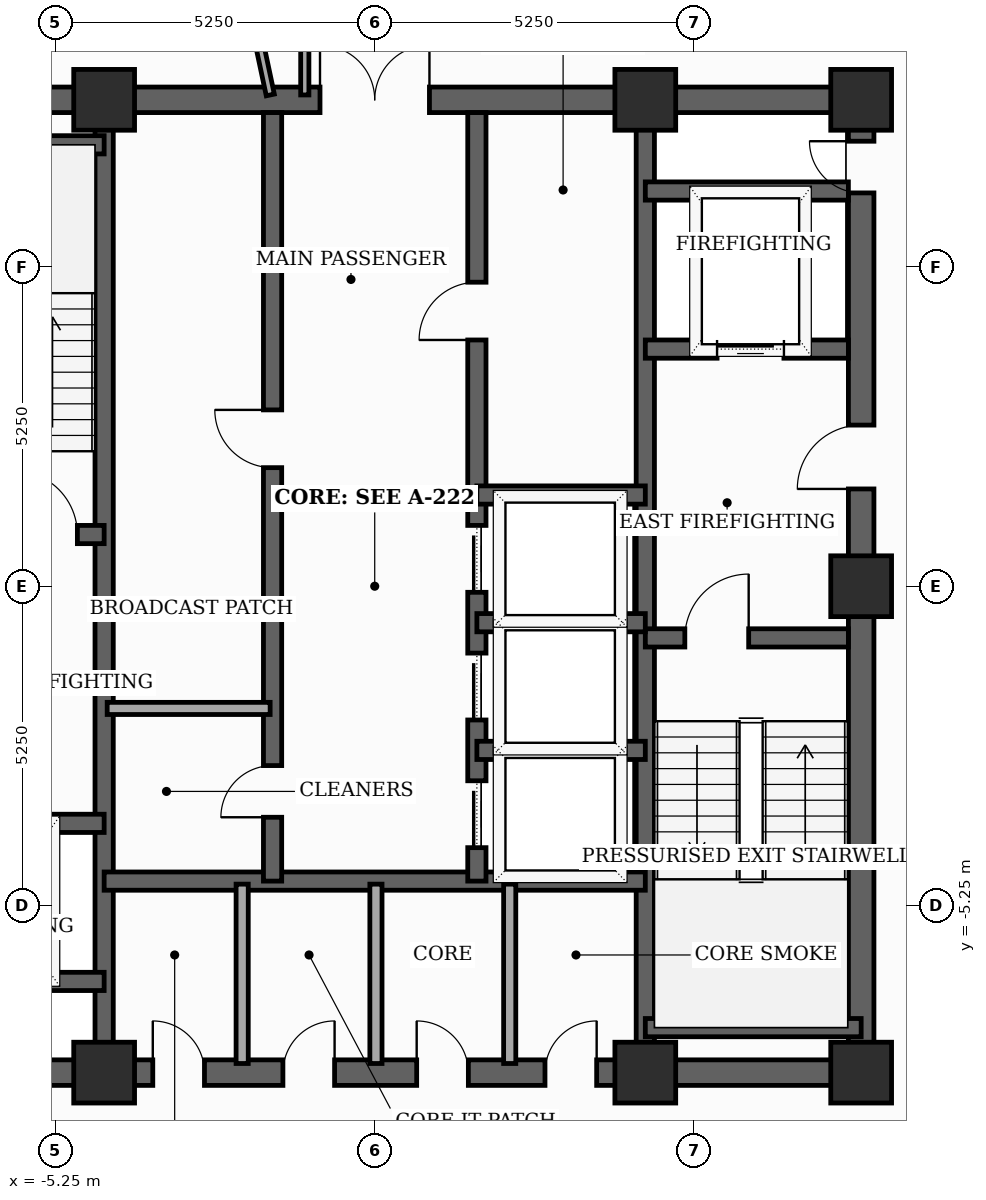
"""IFC4 building model, lengths in metres.
Left out: names, types, materials, properties, quantities, classifications, styles, units other than length and angle.
Written with IfcOpenShell. Run it as: python <this file> out.ifc"""

import sys

from ifc_helpers import new_model, si_unit, direction, frame, frame_2d, origin, origin_2d, place, context, subcontext, project, spatial, rectangle, extrude, element, fill, save


model = new_model("IFC4")
c1 = context("Model", 3, precision=1e-05, world=origin(), true_north=direction((0.0, 1.0)))
c2 = subcontext(c1, "Body", "Model", "MODEL_VIEW")
j1 = project(units=[si_unit("LENGTHUNIT", "METRE"), si_unit("PLANEANGLEUNIT", "RADIAN")], contexts=[c1])
p1 = place(None, origin())
s1 = spatial("IfcSite", under=j1, at=p1, CompositionType="ELEMENT")
p2 = place(p1, origin())
s2 = spatial("IfcBuilding", under=s1, at=p2, CompositionType="ELEMENT")
p3 = place(p2, frame((0.0, 0.0, 270.7)))
s3 = spatial("IfcBuildingStorey", under=s2, at=p3, CompositionType="ELEMENT", Elevation=270.7)
for number, where, z_axis, x_axis in (
    (1, (-4.45, -8.0, 0.0), (0.0, 0.0, 1.0), (1.0, 0.0, 0.0)),
    (2, (4.45, -8.0, 0.0), (0.0, 0.0, 1.0), (1.0, 0.0, 0.0)),
    (3, (8.0, -8.0, 0.0), (0.0, 0.0, 1.0), (1.0, 0.0, 0.0)),
    (4, (8.0, 0.0, 0.0), (0.0, 0.0, 1.0), (1.0, 0.0, 0.0)),
    (5, (8.0, 8.0, 0.0), (0.0, 0.0, 1.0), (1.0, 0.0, 0.0)),
    (6, (4.45, 8.0, 0.0), (0.0, 0.0, 1.0), (1.0, 0.0, 0.0)),
    (7, (-4.45, 8.0, 0.0), (0.0, 0.0, 1.0), (1.0, 0.0, 0.0)),
):
    element("IfcColumn", number, at=place(p3, frame(where, z_axis=z_axis, x_axis=x_axis)), inside=s3, PredefinedType="COLUMN", context=c2, shape_type="SweptSolid", body=[
        extrude(rectangle(XDim=1.0, YDim=1.0, at=origin_2d()), origin(), (0.0, 0.0, 1.0), 3.7),
    ])
p4 = place(p3, frame((8.0, -8.0, 0.0), z_axis=(0.0, 0.0, 1.0), x_axis=(0.0, 1.0, 0.0)))
e8 = element("IfcWall", 8, at=p4, inside=s3, PredefinedType="SHEAR", context=c2, shape_type="SweptSolid", body=[
    extrude(rectangle(XDim=16.0, YDim=0.42, at=frame_2d((8.0, 0.0))), origin(), (0.0, 0.0, 1.0), 3.5),
])
p5 = place(p4, frame((9.6, 0.0, 0.0)))
e9 = element("IfcOpeningElement", 9, at=p5, cuts=e8, PredefinedType="OPENING", context=c2, shape_type="SweptSolid", body=[
    extrude(rectangle(XDim=1.05, YDim=2.15, at=frame_2d((0.525, 1.075))), frame((0.0, 0.22, 0.0), z_axis=(0.0, -1.0, 0.0), x_axis=(1.0, 0.0, 0.0)), (0.0, 0.0, 1.0), 0.44),
])
p6 = place(p4, frame((14.469, 0.0, 0.0)))
e10 = element("IfcOpeningElement", 10, at=p6, cuts=e8, PredefinedType="OPENING", context=c2, shape_type="SweptSolid", body=[
    extrude(rectangle(XDim=0.85, YDim=2.02, at=frame_2d((0.425, 1.01))), frame((0.0, 0.22, 0.0), z_axis=(0.0, -1.0, 0.0), x_axis=(1.0, 0.0, 0.0)), (0.0, 0.0, 1.0), 0.44),
])
p7 = place(p3, frame((-8.0, -8.0, 0.0), z_axis=(0.0, 0.0, 1.0), x_axis=(1.0, 0.0, 0.0)))
e11 = element("IfcWall", 11, at=p7, inside=s3, PredefinedType="SHEAR", context=c2, shape_type="SweptSolid", body=[
    extrude(rectangle(XDim=16.0, YDim=0.42, at=frame_2d((8.0, 0.0))), origin(), (0.0, 0.0, 1.0), 3.5),
])
p8 = place(p7, frame((4.35, 0.0, 0.0)))
e12 = element("IfcOpeningElement", 12, at=p8, cuts=e11, PredefinedType="OPENING", context=c2, shape_type="SweptSolid", body=[
    extrude(rectangle(XDim=0.85, YDim=2.02, at=frame_2d((0.425, 1.01))), frame((0.0, 0.22, 0.0), z_axis=(0.0, -1.0, 0.0), x_axis=(1.0, 0.0, 0.0)), (0.0, 0.0, 1.0), 0.44),
])
p9 = place(p7, frame((6.49, 0.0, 0.0)))
e13 = element("IfcOpeningElement", 13, at=p9, cuts=e11, PredefinedType="OPENING", context=c2, shape_type="SweptSolid", body=[
    extrude(rectangle(XDim=0.85, YDim=2.02, at=frame_2d((0.425, 1.01))), frame((0.0, 0.22, 0.0), z_axis=(0.0, -1.0, 0.0), x_axis=(1.0, 0.0, 0.0)), (0.0, 0.0, 1.0), 0.44),
])
p10 = place(p7, frame((8.69, 0.0, 0.0)))
e14 = element("IfcOpeningElement", 14, at=p10, cuts=e11, PredefinedType="OPENING", context=c2, shape_type="SweptSolid", body=[
    extrude(rectangle(XDim=0.85, YDim=2.02, at=frame_2d((0.425, 1.01))), frame((0.0, 0.22, 0.0), z_axis=(0.0, -1.0, 0.0), x_axis=(1.0, 0.0, 0.0)), (0.0, 0.0, 1.0), 0.44),
])
p11 = place(p7, frame((10.8, 0.0, 0.0)))
e15 = element("IfcOpeningElement", 15, at=p11, cuts=e11, PredefinedType="OPENING", context=c2, shape_type="SweptSolid", body=[
    extrude(rectangle(XDim=0.85, YDim=2.02, at=frame_2d((0.425, 1.01))), frame((0.0, 0.22, 0.0), z_axis=(0.0, -1.0, 0.0), x_axis=(1.0, 0.0, 0.0)), (0.0, 0.0, 1.0), 0.44),
])
p12 = place(p3, frame((-8.0, 8.0, 0.0), z_axis=(0.0, 0.0, 1.0), x_axis=(1.0, 0.0, 0.0)))
e16 = element("IfcWall", 16, at=p12, inside=s3, PredefinedType="SHEAR", context=c2, shape_type="SweptSolid", body=[
    extrude(rectangle(XDim=16.0, YDim=0.42, at=frame_2d((8.0, 0.0))), origin(), (0.0, 0.0, 1.0), 3.5),
])
p13 = place(p12, frame((7.1, 0.0, 0.0)))
e17 = element("IfcOpeningElement", 17, at=p13, cuts=e16, PredefinedType="OPENING", context=c2, shape_type="SweptSolid", body=[
    extrude(rectangle(XDim=1.8, YDim=2.15, at=frame_2d((0.9, 1.075))), frame((0.0, 0.22, 0.0), z_axis=(0.0, -1.0, 0.0), x_axis=(1.0, 0.0, 0.0)), (0.0, 0.0, 1.0), 0.44),
])
for number, where, z_axis, x_axis in (
    (18, (-4.45, -7.79, 0.0), (0.0, 0.0, 1.0), (0.0, 1.0, 0.0)),
    (19, (4.45, -7.79, 0.0), (0.0, 0.0, 1.0), (0.0, 1.0, 0.0)),
):
    element("IfcWall", number, at=place(p3, frame(where, z_axis=z_axis, x_axis=x_axis)), inside=s3, PredefinedType="SHEAR", context=c2, shape_type="SweptSolid", body=[
        extrude(rectangle(XDim=15.58, YDim=0.3, at=frame_2d((7.79, 0.0))), origin(), (0.0, 0.0, 1.0), 3.5),
    ])
p14 = place(p3, frame((-7.79, 0.85, 0.0), z_axis=(0.0, 0.0, 1.0), x_axis=(1.0, 0.0, 0.0)))
e20 = element("IfcWall", 20, at=p14, inside=s3, PredefinedType="SHEAR", context=c2, shape_type="SweptSolid", body=[
    extrude(rectangle(XDim=3.34, YDim=0.3, at=frame_2d((1.67, 0.0))), origin(), (0.0, 0.0, 1.0), 3.5),
])
p15 = place(p14, frame((1.85, 0.0, 0.0)))
e21 = element("IfcOpeningElement", 21, at=p15, cuts=e20, PredefinedType="OPENING", context=c2, shape_type="SweptSolid", body=[
    extrude(rectangle(XDim=1.05, YDim=2.15, at=frame_2d((0.525, 1.075))), frame((0.0, 0.16, 0.0), z_axis=(0.0, -1.0, 0.0), x_axis=(1.0, 0.0, 0.0)), (0.0, 0.0, 1.0), 0.32),
])
p16 = place(p3, frame((-7.79, 7.26, 0.0), z_axis=(0.0, 0.0, 1.0), x_axis=(1.0, 0.0, 0.0)))
e22 = element("IfcWall", 22, at=p16, inside=s3, PredefinedType="SHEAR", context=c2, shape_type="SweptSolid", body=[
    extrude(rectangle(XDim=3.34, YDim=0.3, at=frame_2d((1.67, 0.0))), origin(), (0.0, 0.0, 1.0), 3.5),
])
p17 = place(p3, frame((4.45, -0.85, 0.0), z_axis=(0.0, 0.0, 1.0), x_axis=(1.0, 0.0, 0.0)))
e23 = element("IfcWall", 23, at=p17, inside=s3, PredefinedType="SHEAR", context=c2, shape_type="SweptSolid", body=[
    extrude(rectangle(XDim=3.34, YDim=0.3, at=frame_2d((1.67, 0.0))), origin(), (0.0, 0.0, 1.0), 3.5),
])
p18 = place(p17, frame((0.65, 0.0, 0.0)))
e24 = element("IfcOpeningElement", 24, at=p18, cuts=e23, PredefinedType="OPENING", context=c2, shape_type="SweptSolid", body=[
    extrude(rectangle(XDim=1.05, YDim=2.15, at=frame_2d((0.525, 1.075))), frame((0.0, 0.16, 0.0), z_axis=(0.0, -1.0, 0.0), x_axis=(1.0, 0.0, 0.0)), (0.0, 0.0, 1.0), 0.32),
])
p19 = place(p3, frame((4.45, -7.26, 0.0), z_axis=(0.0, 0.0, 1.0), x_axis=(1.0, 0.0, 0.0)))
e25 = element("IfcWall", 25, at=p19, inside=s3, PredefinedType="SHEAR", context=c2, shape_type="SweptSolid", body=[
    extrude(rectangle(XDim=3.55, YDim=0.3, at=frame_2d((1.775, 0.0))), origin(), (0.0, 0.0, 1.0), 3.5),
])
p20 = place(p3, frame((-7.79, -3.9, 0.0), z_axis=(0.0, 0.0, 1.0), x_axis=(1.0, 0.0, 0.0)))
e26 = element("IfcWall", 26, at=p20, inside=s3, PredefinedType="SHEAR", context=c2, shape_type="SweptSolid", body=[
    extrude(rectangle(XDim=3.34, YDim=0.3, at=frame_2d((1.67, 0.0))), origin(), (0.0, 0.0, 1.0), 3.5),
])
p21 = place(p20, frame((1.27, 0.0, 0.0)))
e27 = element("IfcOpeningElement", 27, at=p21, cuts=e26, PredefinedType="OPENING", context=c2, shape_type="SweptSolid", body=[
    extrude(rectangle(XDim=1.1, YDim=2.1, at=frame_2d((0.55, 1.05))), frame((0.0, 0.16, 0.0), z_axis=(0.0, -1.0, 0.0), x_axis=(1.0, 0.0, 0.0)), (0.0, 0.0, 1.0), 0.32),
])
p22 = place(p3, frame((-7.79, -6.5, 0.0), z_axis=(0.0, 0.0, 1.0), x_axis=(1.0, 0.0, 0.0)))
e28 = element("IfcWall", 28, at=p22, inside=s3, PredefinedType="SHEAR", context=c2, shape_type="SweptSolid", body=[
    extrude(rectangle(XDim=3.34, YDim=0.3, at=frame_2d((1.67, 0.0))), origin(), (0.0, 0.0, 1.0), 3.5),
])
p23 = place(p3, frame((4.45, 3.9, 0.0), z_axis=(0.0, 0.0, 1.0), x_axis=(1.0, 0.0, 0.0)))
e29 = element("IfcWall", 29, at=p23, inside=s3, PredefinedType="SHEAR", context=c2, shape_type="SweptSolid", body=[
    extrude(rectangle(XDim=3.34, YDim=0.3, at=frame_2d((1.67, 0.0))), origin(), (0.0, 0.0, 1.0), 3.5),
])
p24 = place(p23, frame((1.18, 0.0, 0.0)))
e30 = element("IfcOpeningElement", 30, at=p24, cuts=e29, PredefinedType="OPENING", context=c2, shape_type="SweptSolid", body=[
    extrude(rectangle(XDim=1.1, YDim=2.1, at=frame_2d((0.55, 1.05))), frame((0.0, 0.16, 0.0), z_axis=(0.0, -1.0, 0.0), x_axis=(1.0, 0.0, 0.0)), (0.0, 0.0, 1.0), 0.32),
])
p25 = place(p3, frame((4.45, 6.5, 0.0), z_axis=(0.0, 0.0, 1.0), x_axis=(1.0, 0.0, 0.0)))
e31 = element("IfcWall", 31, at=p25, inside=s3, PredefinedType="SHEAR", context=c2, shape_type="SweptSolid", body=[
    extrude(rectangle(XDim=3.34, YDim=0.3, at=frame_2d((1.67, 0.0))), origin(), (0.0, 0.0, 1.0), 3.5),
])
p26 = place(p3, frame((-4.45, -4.85, 0.0), z_axis=(0.0, 0.0, 1.0), x_axis=(1.0, 0.0, 0.0)))
e32 = element("IfcWall", 32, at=p26, inside=s3, PredefinedType="SHEAR", context=c2, shape_type="SweptSolid", body=[
    extrude(rectangle(XDim=8.9, YDim=0.3, at=frame_2d((4.45, 0.0))), origin(), (0.0, 0.0, 1.0), 3.5),
])
p27 = place(p3, frame((-1.68, -4.85, 0.0), z_axis=(0.0, 0.0, 1.0), x_axis=(0.0, 1.0, 0.0)))
e33 = element("IfcWall", 33, at=p27, inside=s3, PredefinedType="SHEAR", context=c2, shape_type="SweptSolid", body=[
    extrude(rectangle(XDim=12.64, YDim=0.3, at=frame_2d((6.32, 0.0))), origin(), (0.0, 0.0, 1.0), 3.5),
])
p28 = place(p27, frame((1.05, 0.0, 0.0)))
e34 = element("IfcOpeningElement", 34, at=p28, cuts=e33, PredefinedType="OPENING", context=c2, shape_type="SweptSolid", body=[
    extrude(rectangle(XDim=0.85, YDim=2.02, at=frame_2d((0.425, 1.01))), frame((0.0, 0.16, 0.0), z_axis=(0.0, -1.0, 0.0), x_axis=(1.0, 0.0, 0.0)), (0.0, 0.0, 1.0), 0.32),
])
p29 = place(p27, frame((6.8, 0.0, 0.0)))
e35 = element("IfcOpeningElement", 35, at=p29, cuts=e33, PredefinedType="OPENING", context=c2, shape_type="SweptSolid", body=[
    extrude(rectangle(XDim=0.95, YDim=2.1, at=frame_2d((0.475, 1.05))), frame((0.0, 0.16, 0.0), z_axis=(0.0, -1.0, 0.0), x_axis=(1.0, 0.0, 0.0)), (0.0, 0.0, 1.0), 0.32),
])
p30 = place(p3, frame((1.68, -4.85, 0.0), z_axis=(0.0, 0.0, 1.0), x_axis=(0.0, 1.0, 0.0)))
e36 = element("IfcWall", 36, at=p30, inside=s3, PredefinedType="SHEAR", context=c2, shape_type="SweptSolid", body=[
    extrude(rectangle(XDim=12.64, YDim=0.3, at=frame_2d((6.32, 0.0))), origin(), (0.0, 0.0, 1.0), 3.5),
])
p31 = place(p30, frame((0.55, 0.0, 0.0)))
e37 = element("IfcOpeningElement", 37, at=p31, cuts=e36, PredefinedType="OPENING", context=c2, shape_type="SweptSolid", body=[
    extrude(rectangle(XDim=1.1, YDim=2.1, at=frame_2d((0.55, 1.05))), frame((0.0, 0.16, 0.0), z_axis=(0.0, -1.0, 0.0), x_axis=(1.0, 0.0, 0.0)), (0.0, 0.0, 1.0), 0.32),
])
p32 = place(p30, frame((2.65, 0.0, 0.0)))
e38 = element("IfcOpeningElement", 38, at=p32, cuts=e36, PredefinedType="OPENING", context=c2, shape_type="SweptSolid", body=[
    extrude(rectangle(XDim=1.1, YDim=2.1, at=frame_2d((0.55, 1.05))), frame((0.0, 0.16, 0.0), z_axis=(0.0, -1.0, 0.0), x_axis=(1.0, 0.0, 0.0)), (0.0, 0.0, 1.0), 0.32),
])
p33 = place(p30, frame((4.75, 0.0, 0.0)))
e39 = element("IfcOpeningElement", 39, at=p33, cuts=e36, PredefinedType="OPENING", context=c2, shape_type="SweptSolid", body=[
    extrude(rectangle(XDim=1.1, YDim=2.1, at=frame_2d((0.55, 1.05))), frame((0.0, 0.16, 0.0), z_axis=(0.0, -1.0, 0.0), x_axis=(1.0, 0.0, 0.0)), (0.0, 0.0, 1.0), 0.32),
])
p34 = place(p30, frame((8.9, 0.0, 0.0)))
e40 = element("IfcOpeningElement", 40, at=p34, cuts=e36, PredefinedType="OPENING", context=c2, shape_type="SweptSolid", body=[
    extrude(rectangle(XDim=0.95, YDim=2.1, at=frame_2d((0.475, 1.05))), frame((0.0, 0.16, 0.0), z_axis=(0.0, -1.0, 0.0), x_axis=(1.0, 0.0, 0.0)), (0.0, 0.0, 1.0), 0.32),
])
for number, where, z_axis, x_axis in (
    (41, (1.68, 1.5, 0.0), (0.0, 0.0, 1.0), (1.0, 0.0, 0.0)),
    (42, (1.68, -2.7, 0.0), (0.0, 0.0, 1.0), (1.0, 0.0, 0.0)),
    (43, (1.68, -0.6, 0.0), (0.0, 0.0, 1.0), (1.0, 0.0, 0.0)),
):
    element("IfcWall", number, at=place(p3, frame(where, z_axis=z_axis, x_axis=x_axis)), inside=s3, PredefinedType="SHEAR", context=c2, shape_type="SweptSolid", body=[
        extrude(rectangle(XDim=2.77, YDim=0.3, at=frame_2d((1.385, 0.0))), origin(), (0.0, 0.0, 1.0), 3.5),
    ])
for number, where, z_axis, x_axis in (
    (44, (-2.18, -7.85, 0.0), (0.0, 0.0, 1.0), (0.0, 1.0, 0.0)),
    (45, (0.02, -7.85, 0.0), (0.0, 0.0, 1.0), (0.0, 1.0, 0.0)),
    (46, (2.22, -7.85, 0.0), (0.0, 0.0, 1.0), (0.0, 1.0, 0.0)),
):
    element("IfcWall", number, at=place(p3, frame(where, z_axis=z_axis, x_axis=x_axis)), inside=s3, PredefinedType="SOLIDWALL", context=c2, shape_type="SweptSolid", body=[
        extrude(rectangle(XDim=2.95, YDim=0.2, at=frame_2d((1.475, 0.0))), origin(), (0.0, 0.0, 1.0), 2.885),
    ])
p35 = place(p3, frame((-4.4, -2.01, 0.0), z_axis=(0.0, 0.0, 1.0), x_axis=(1.0, 0.0, 0.0)))
e47 = element("IfcWall", 47, at=p35, inside=s3, PredefinedType="SOLIDWALL", context=c2, shape_type="SweptSolid", body=[
    extrude(rectangle(XDim=2.68, YDim=0.2, at=frame_2d((1.34, 0.0))), origin(), (0.0, 0.0, 1.0), 3.5),
])
p36 = place(p3, frame((-1.15, 10.65, 0.0), z_axis=(0.0, 0.0, 1.0), x_axis=(0.0, -1.0, 0.0)))
e48 = element("IfcWall", 48, at=p36, inside=s3, PredefinedType="PARTITIONING", context=c2, shape_type="SweptSolid", body=[
    extrude(rectangle(XDim=2.57, YDim=0.135, at=frame_2d((1.285, 0.0))), origin(), (0.0, 0.0, 1.0), 2.885),
])
p37 = place(p3, frame((-2.99, 14.065, 0.0), z_axis=(0.0, 0.0, 1.0), x_axis=(0.207910291146, -0.978147898242, 0.0)))
e49 = element("IfcWall", 49, at=p37, inside=s3, PredefinedType="PARTITIONING", context=c2, shape_type="SweptSolid", body=[
    extrude(rectangle(XDim=6.119, YDim=0.135, at=frame_2d((3.06, 0.0))), origin(), (0.0, 0.0, 1.0), 2.885),
])
p38 = place(p37, frame((2.6, 0.0, 0.0)))
e50 = element("IfcOpeningElement", 50, at=p38, cuts=e49, PredefinedType="OPENING", context=c2, shape_type="SweptSolid", body=[
    extrude(rectangle(XDim=0.92, YDim=2.1, at=frame_2d((0.46, 1.05))), frame((0.0, 0.077, 0.0), z_axis=(0.0, -1.0, 0.0), x_axis=(1.0, 0.0, 0.0)), (0.0, 0.0, 1.0), 0.155),
])
p39 = place(p5, origin())
e51 = element("IfcDoor", 51, at=p39, inside=s3, OperationType="SINGLE_SWING_LEFT", PredefinedType="DOOR", context=c2, shape_type="SweptSolid", body=[
    extrude(rectangle(XDim=1.05, YDim=2.15, at=frame_2d((0.525, 1.075))), frame((0.0, 0.025, 0.0), z_axis=(0.0, -1.0, 0.0), x_axis=(1.0, 0.0, 0.0)), (0.0, 0.0, 1.0), 0.05),
])
fill(e9, e51)
p40 = place(p6, origin())
e52 = element("IfcDoor", 52, at=p40, inside=s3, OperationType="SINGLE_SWING_RIGHT", PredefinedType="TRAPDOOR", context=c2, shape_type="SweptSolid", body=[
    extrude(rectangle(XDim=0.85, YDim=2.02, at=frame_2d((0.425, 1.01))), frame((0.0, 0.025, 0.0), z_axis=(0.0, -1.0, 0.0), x_axis=(1.0, 0.0, 0.0)), (0.0, 0.0, 1.0), 0.05),
])
fill(e10, e52)
p41 = place(p8, origin())
e53 = element("IfcDoor", 53, at=p41, inside=s3, OperationType="SINGLE_SWING_LEFT", PredefinedType="TRAPDOOR", context=c2, shape_type="SweptSolid", body=[
    extrude(rectangle(XDim=0.85, YDim=2.02, at=frame_2d((0.425, 1.01))), frame((0.0, 0.025, 0.0), z_axis=(0.0, -1.0, 0.0), x_axis=(1.0, 0.0, 0.0)), (0.0, 0.0, 1.0), 0.05),
])
fill(e12, e53)
p42 = place(p9, origin())
e54 = element("IfcDoor", 54, at=p42, inside=s3, OperationType="SINGLE_SWING_RIGHT", PredefinedType="TRAPDOOR", context=c2, shape_type="SweptSolid", body=[
    extrude(rectangle(XDim=0.85, YDim=2.02, at=frame_2d((0.425, 1.01))), frame((0.0, 0.025, 0.0), z_axis=(0.0, -1.0, 0.0), x_axis=(1.0, 0.0, 0.0)), (0.0, 0.0, 1.0), 0.05),
])
fill(e13, e54)
p43 = place(p10, origin())
e55 = element("IfcDoor", 55, at=p43, inside=s3, OperationType="SINGLE_SWING_LEFT", PredefinedType="TRAPDOOR", context=c2, shape_type="SweptSolid", body=[
    extrude(rectangle(XDim=0.85, YDim=2.02, at=frame_2d((0.425, 1.01))), frame((0.0, 0.025, 0.0), z_axis=(0.0, -1.0, 0.0), x_axis=(1.0, 0.0, 0.0)), (0.0, 0.0, 1.0), 0.05),
])
fill(e14, e55)
p44 = place(p11, origin())
e56 = element("IfcDoor", 56, at=p44, inside=s3, OperationType="SINGLE_SWING_RIGHT", PredefinedType="TRAPDOOR", context=c2, shape_type="SweptSolid", body=[
    extrude(rectangle(XDim=0.85, YDim=2.02, at=frame_2d((0.425, 1.01))), frame((0.0, 0.025, 0.0), z_axis=(0.0, -1.0, 0.0), x_axis=(1.0, 0.0, 0.0)), (0.0, 0.0, 1.0), 0.05),
])
fill(e15, e56)
p45 = place(p13, origin())
e57 = element("IfcDoor", 57, at=p45, inside=s3, OperationType="DOUBLE_DOOR_SINGLE_SWING", PredefinedType="DOOR", context=c2, shape_type="SweptSolid", body=[
    extrude(rectangle(XDim=1.8, YDim=2.15, at=frame_2d((0.9, 1.075))), frame((0.0, 0.025, 0.0), z_axis=(0.0, -1.0, 0.0), x_axis=(1.0, 0.0, 0.0)), (0.0, 0.0, 1.0), 0.05),
])
fill(e17, e57)
p46 = place(p15, origin())
e58 = element("IfcDoor", 58, at=p46, inside=s3, OperationType="SINGLE_SWING_LEFT", PredefinedType="DOOR", context=c2, shape_type="SweptSolid", body=[
    extrude(rectangle(XDim=1.05, YDim=2.15, at=frame_2d((0.525, 1.075))), frame((0.0, 0.025, 0.0), z_axis=(0.0, -1.0, 0.0), x_axis=(1.0, 0.0, 0.0)), (0.0, 0.0, 1.0), 0.05),
])
fill(e21, e58)
p47 = place(p18, origin())
e59 = element("IfcDoor", 59, at=p47, inside=s3, OperationType="SINGLE_SWING_RIGHT", PredefinedType="DOOR", context=c2, shape_type="SweptSolid", body=[
    extrude(rectangle(XDim=1.05, YDim=2.15, at=frame_2d((0.525, 1.075))), frame((0.0, 0.025, 0.0), z_axis=(0.0, -1.0, 0.0), x_axis=(1.0, 0.0, 0.0)), (0.0, 0.0, 1.0), 0.05),
])
fill(e24, e59)
p48 = place(p24, origin())
e60 = element("IfcDoor", 60, at=p48, inside=s3, OperationType="SLIDING_TO_LEFT", PredefinedType="DOOR", context=c2, shape_type="SweptSolid", body=[
    extrude(rectangle(XDim=1.1, YDim=2.1, at=frame_2d((0.55, 1.05))), frame((0.0, 0.025, 0.0), z_axis=(0.0, -1.0, 0.0), x_axis=(1.0, 0.0, 0.0)), (0.0, 0.0, 1.0), 0.05),
])
fill(e30, e60)
p49 = place(p28, origin())
e61 = element("IfcDoor", 61, at=p49, inside=s3, OperationType="SINGLE_SWING_LEFT", PredefinedType="TRAPDOOR", context=c2, shape_type="SweptSolid", body=[
    extrude(rectangle(XDim=0.85, YDim=2.02, at=frame_2d((0.425, 1.01))), frame((0.0, 0.025, 0.0), z_axis=(0.0, -1.0, 0.0), x_axis=(1.0, 0.0, 0.0)), (0.0, 0.0, 1.0), 0.05),
])
fill(e34, e61)
p50 = place(p29, origin())
e62 = element("IfcDoor", 62, at=p50, inside=s3, OperationType="SINGLE_SWING_RIGHT", PredefinedType="DOOR", context=c2, shape_type="SweptSolid", body=[
    extrude(rectangle(XDim=0.95, YDim=2.1, at=frame_2d((0.475, 1.05))), frame((0.0, 0.025, 0.0), z_axis=(0.0, -1.0, 0.0), x_axis=(1.0, 0.0, 0.0)), (0.0, 0.0, 1.0), 0.05),
])
fill(e35, e62)
p51 = place(p31, origin())
e63 = element("IfcDoor", 63, at=p51, inside=s3, OperationType="SLIDING_TO_LEFT", PredefinedType="DOOR", context=c2, shape_type="SweptSolid", body=[
    extrude(rectangle(XDim=1.1, YDim=2.1, at=frame_2d((0.55, 1.05))), frame((0.0, 0.025, 0.0), z_axis=(0.0, -1.0, 0.0), x_axis=(1.0, 0.0, 0.0)), (0.0, 0.0, 1.0), 0.05),
])
fill(e37, e63)
p52 = place(p32, origin())
e64 = element("IfcDoor", 64, at=p52, inside=s3, OperationType="SLIDING_TO_LEFT", PredefinedType="DOOR", context=c2, shape_type="SweptSolid", body=[
    extrude(rectangle(XDim=1.1, YDim=2.1, at=frame_2d((0.55, 1.05))), frame((0.0, 0.025, 0.0), z_axis=(0.0, -1.0, 0.0), x_axis=(1.0, 0.0, 0.0)), (0.0, 0.0, 1.0), 0.05),
])
fill(e38, e64)
p53 = place(p33, origin())
e65 = element("IfcDoor", 65, at=p53, inside=s3, OperationType="SLIDING_TO_LEFT", PredefinedType="DOOR", context=c2, shape_type="SweptSolid", body=[
    extrude(rectangle(XDim=1.1, YDim=2.1, at=frame_2d((0.55, 1.05))), frame((0.0, 0.025, 0.0), z_axis=(0.0, -1.0, 0.0), x_axis=(1.0, 0.0, 0.0)), (0.0, 0.0, 1.0), 0.05),
])
fill(e39, e65)
p54 = place(p34, origin())
e66 = element("IfcDoor", 66, at=p54, inside=s3, OperationType="SINGLE_SWING_LEFT", PredefinedType="DOOR", context=c2, shape_type="SweptSolid", body=[
    extrude(rectangle(XDim=0.95, YDim=2.1, at=frame_2d((0.475, 1.05))), frame((0.0, 0.025, 0.0), z_axis=(0.0, -1.0, 0.0), x_axis=(1.0, 0.0, 0.0)), (0.0, 0.0, 1.0), 0.05),
])
fill(e40, e66)
save(model, sys.argv[1])
